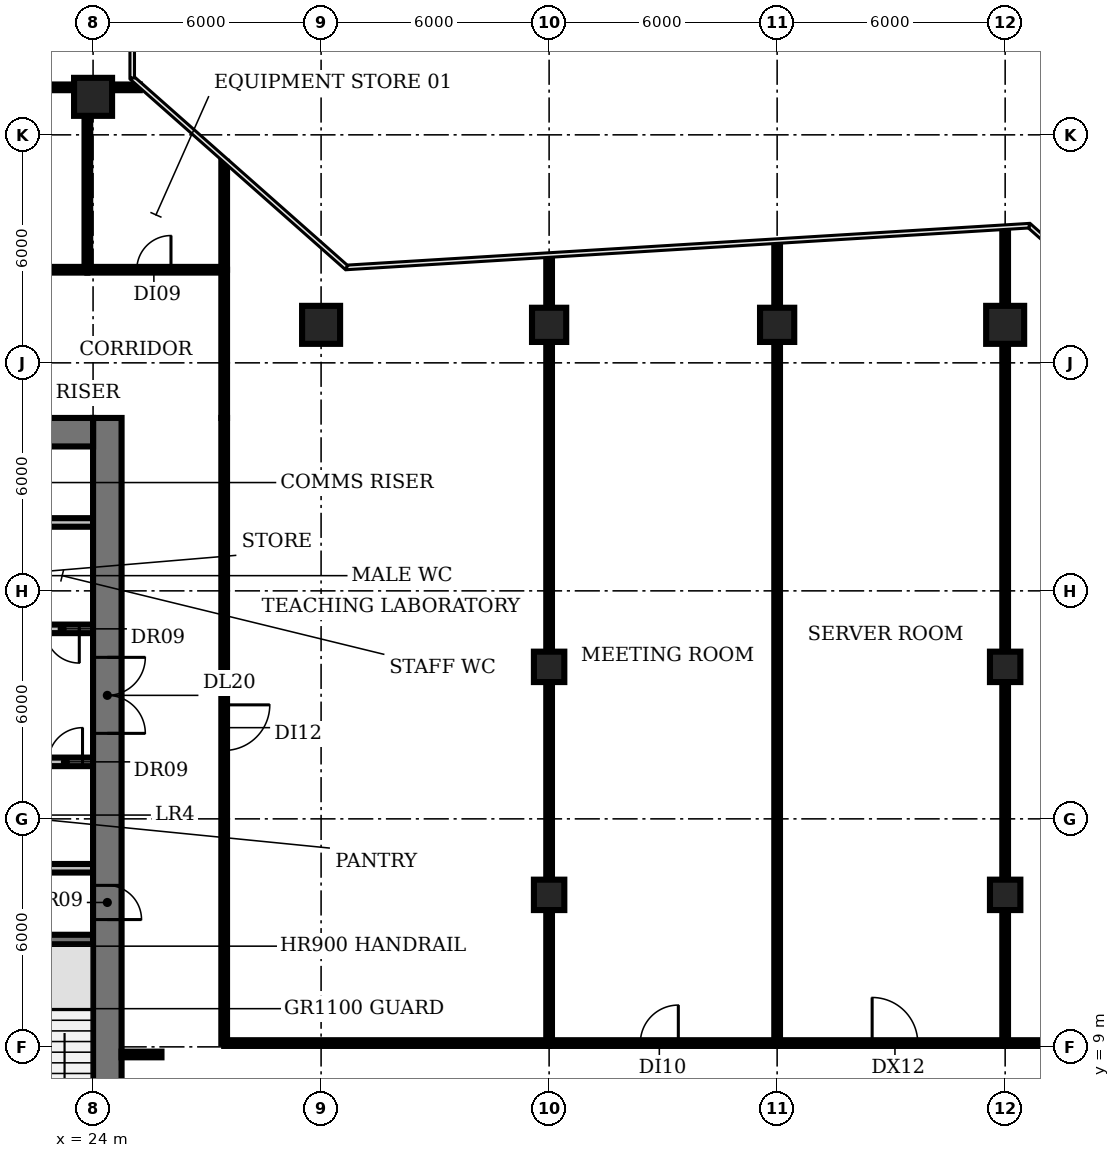
"""IFC4 building model, lengths in metres.
Left out: names, types, materials, properties, quantities, classifications, styles, units other than length and angle.
Written with IfcOpenShell. Run it as: python <this file> out.ifc"""

import sys

from ifc_helpers import new_model, si_unit, direction, frame, frame_2d, origin, origin_2d, place, context, subcontext, project, spatial, rectangle, circle, extrude, element, fill, save


model = new_model("IFC4")
c1 = context("Model", 3, precision=1e-05, world=origin(), true_north=direction((0.0, 1.0)))
c2 = subcontext(c1, "Body", "Model", "MODEL_VIEW")
j1 = project(units=[si_unit("LENGTHUNIT", "METRE"), si_unit("PLANEANGLEUNIT", "RADIAN")], contexts=[c1])
p1 = place(None, origin())
s1 = spatial("IfcSite", under=j1, at=p1, CompositionType="ELEMENT")
p2 = place(p1, origin())
s2 = spatial("IfcBuilding", under=s1, at=p2, CompositionType="ELEMENT")
p3 = place(p2, frame((0.0, 0.0, 96.2)))
s3 = spatial("IfcBuildingStorey", under=s2, at=p3, CompositionType="ELEMENT", Elevation=96.2)
for number, where, z_axis, x_axis in (
    (1, (24.0, 34.0, 0.0), (0.0, 0.0, 1.0), (1.0, 0.0, 0.0)),
    (2, (30.0, 28.0, 0.0), (0.0, 0.0, 1.0), (1.0, 0.0, 0.0)),
):
    element("IfcColumn", number, at=place(p3, frame(where, z_axis=z_axis, x_axis=x_axis)), inside=s3, PredefinedType="COLUMN", context=c2, shape_type="SweptSolid", body=[
        extrude(circle(Radius=0.5, at=origin_2d()), origin(), (0.0, 0.0, 1.0), 3.85),
    ])
for number, where, z_axis, x_axis in (
    (3, (36.0, 13.0, 0.0), (0.0, 0.0, 1.0), (1.0, 0.0, 0.0)),
    (4, (36.0, 19.0, 0.0), (0.0, 0.0, 1.0), (1.0, 0.0, 0.0)),
):
    element("IfcColumn", number, at=place(p3, frame(where, z_axis=z_axis, x_axis=x_axis)), inside=s3, PredefinedType="COLUMN", context=c2, shape_type="SweptSolid", body=[
        extrude(rectangle(XDim=0.8, YDim=0.8, at=origin_2d()), origin(), (0.0, 0.0, 1.0), 3.85),
    ])
for number, where, z_axis, x_axis in (
    (5, (36.0, 28.0, 0.0), (0.0, 0.0, 1.0), (1.0, 0.0, 0.0)),
    (6, (42.0, 28.0, 0.0), (0.0, 0.0, 1.0), (1.0, 0.0, 0.0)),
):
    element("IfcColumn", number, at=place(p3, frame(where, z_axis=z_axis, x_axis=x_axis)), inside=s3, PredefinedType="COLUMN", context=c2, shape_type="SweptSolid", body=[
        extrude(rectangle(XDim=0.9, YDim=0.9, at=origin_2d()), origin(), (0.0, 0.0, 1.0), 3.85),
    ])
for number, where, z_axis, x_axis in (
    (7, (48.0, 13.0, 0.0), (0.0, 0.0, 1.0), (1.0, 0.0, 0.0)),
    (8, (48.0, 19.0, 0.0), (0.0, 0.0, 1.0), (1.0, 0.0, 0.0)),
):
    element("IfcColumn", number, at=place(p3, frame(where, z_axis=z_axis, x_axis=x_axis)), inside=s3, PredefinedType="COLUMN", context=c2, shape_type="SweptSolid", body=[
        extrude(rectangle(XDim=0.8, YDim=0.8, at=origin_2d()), origin(), (0.0, 0.0, 1.0), 3.85),
    ])
p4 = place(p3, frame((48.0, 28.0, 0.0), z_axis=(0.0, 0.0, 1.0), x_axis=(1.0, 0.0, 0.0)))
e9 = element("IfcColumn", 9, at=p4, inside=s3, PredefinedType="COLUMN", context=c2, shape_type="SweptSolid", body=[
    extrude(circle(Radius=0.5, at=origin_2d()), origin(), (0.0, 0.0, 1.0), 3.85),
])
p5 = place(p3, frame((20.85, 11.825, 0.0), z_axis=(0.0, 0.0, 1.0), x_axis=(1.0, 0.0, 0.0)))
e10 = element("IfcWall", 10, at=p5, inside=s3, PredefinedType="SHEAR", context=c2, shape_type="SweptSolid", body=[
    extrude(rectangle(XDim=3.15, YDim=0.25, at=frame_2d((1.575, 0.0))), origin(), (0.0, 0.0, 1.0), 3.85),
])
p6 = place(p3, frame((16.6, 13.7, 0.0), z_axis=(0.0, 0.0, 1.0), x_axis=(1.0, 0.0, 0.0)))
e11 = element("IfcWall", 11, at=p6, inside=s3, PredefinedType="PARTITIONING", context=c2, shape_type="SweptSolid", body=[
    extrude(rectangle(XDim=7.4, YDim=0.225, at=frame_2d((3.7, 0.0))), origin(), (0.0, 0.0, 1.0), 3.85),
])
p7 = place(p3, frame((9.4, 16.5, 0.0), z_axis=(0.0, 0.0, 1.0), x_axis=(1.0, 0.0, 0.0)))
e12 = element("IfcWall", 12, at=p7, inside=s3, PredefinedType="PARTITIONING", context=c2, shape_type="SweptSolid", body=[
    extrude(rectangle(XDim=14.6, YDim=0.225, at=frame_2d((7.3, 0.0))), origin(), (0.0, 0.0, 1.0), 3.85),
])
p8 = place(p7, frame((0.75, 0.0, 0.0)))
e13 = element("IfcOpeningElement", 13, at=p8, cuts=e12, PredefinedType="OPENING", context=c2, shape_type="SweptSolid", body=[
    extrude(rectangle(XDim=1.1, YDim=2.1, at=frame_2d((0.55, 1.05))), frame((0.0, 0.123, 0.0), z_axis=(0.0, -1.0, 0.0), x_axis=(1.0, 0.0, 0.0)), (0.0, 0.0, 1.0), 0.245),
])
p9 = place(p7, frame((3.55, 0.0, 0.0)))
e14 = element("IfcOpeningElement", 14, at=p9, cuts=e12, PredefinedType="OPENING", context=c2, shape_type="SweptSolid", body=[
    extrude(rectangle(XDim=1.1, YDim=2.1, at=frame_2d((0.55, 1.05))), frame((0.0, 0.123, 0.0), z_axis=(0.0, -1.0, 0.0), x_axis=(1.0, 0.0, 0.0)), (0.0, 0.0, 1.0), 0.245),
])
p10 = place(p7, frame((6.35, 0.0, 0.0)))
e15 = element("IfcOpeningElement", 15, at=p10, cuts=e12, PredefinedType="OPENING", context=c2, shape_type="SweptSolid", body=[
    extrude(rectangle(XDim=1.1, YDim=2.1, at=frame_2d((0.55, 1.05))), frame((0.0, 0.123, 0.0), z_axis=(0.0, -1.0, 0.0), x_axis=(1.0, 0.0, 0.0)), (0.0, 0.0, 1.0), 0.245),
])
p11 = place(p7, frame((9.15, 0.0, 0.0)))
e16 = element("IfcOpeningElement", 16, at=p11, cuts=e12, PredefinedType="OPENING", context=c2, shape_type="SweptSolid", body=[
    extrude(rectangle(XDim=1.1, YDim=2.1, at=frame_2d((0.55, 1.05))), frame((0.0, 0.123, 0.0), z_axis=(0.0, -1.0, 0.0), x_axis=(1.0, 0.0, 0.0)), (0.0, 0.0, 1.0), 0.245),
])
p12 = place(p7, frame((11.647, 0.0, 0.0)))
e17 = element("IfcOpeningElement", 17, at=p12, cuts=e12, PredefinedType="OPENING", context=c2, shape_type="SweptSolid", body=[
    extrude(rectangle(XDim=0.9, YDim=2.1, at=frame_2d((0.45, 1.05))), frame((0.0, 0.123, 0.0), z_axis=(0.0, -1.0, 0.0), x_axis=(1.0, 0.0, 0.0)), (0.0, 0.0, 1.0), 0.245),
])
p13 = place(p7, frame((13.423, 0.0, 0.0)))
e18 = element("IfcOpeningElement", 18, at=p13, cuts=e12, PredefinedType="OPENING", context=c2, shape_type="SweptSolid", body=[
    extrude(rectangle(XDim=0.9, YDim=2.1, at=frame_2d((0.45, 1.05))), frame((0.0, 0.123, 0.0), z_axis=(0.0, -1.0, 0.0), x_axis=(1.0, 0.0, 0.0)), (0.0, 0.0, 1.0), 0.245),
])
p14 = place(p3, frame((24.0, 20.0, 0.0), z_axis=(0.0, 0.0, 1.0), x_axis=(-1.0, 0.0, 0.0)))
e19 = element("IfcWall", 19, at=p14, inside=s3, PredefinedType="PARTITIONING", context=c2, shape_type="SweptSolid", body=[
    extrude(rectangle(XDim=14.6, YDim=0.225, at=frame_2d((7.3, 0.0))), origin(), (0.0, 0.0, 1.0), 3.85),
])
p15 = place(p14, frame((12.5, 0.0, 0.0)))
e20 = element("IfcOpeningElement", 20, at=p15, cuts=e19, PredefinedType="OPENING", context=c2, shape_type="SweptSolid", body=[
    extrude(rectangle(XDim=1.0, YDim=2.1, at=frame_2d((0.5, 1.05))), frame((0.0, 0.123, 0.0), z_axis=(0.0, -1.0, 0.0), x_axis=(1.0, 0.0, 0.0)), (0.0, 0.0, 1.0), 0.245),
])
p16 = place(p14, frame((8.825, 0.0, 0.0)))
e21 = element("IfcOpeningElement", 21, at=p16, cuts=e19, PredefinedType="OPENING", context=c2, shape_type="SweptSolid", body=[
    extrude(rectangle(XDim=1.0, YDim=2.1, at=frame_2d((0.5, 1.05))), frame((0.0, 0.123, 0.0), z_axis=(0.0, -1.0, 0.0), x_axis=(1.0, 0.0, 0.0)), (0.0, 0.0, 1.0), 0.245),
])
p17 = place(p14, frame((4.925, 0.0, 0.0)))
e22 = element("IfcOpeningElement", 22, at=p17, cuts=e19, PredefinedType="OPENING", context=c2, shape_type="SweptSolid", body=[
    extrude(rectangle(XDim=1.0, YDim=2.1, at=frame_2d((0.5, 1.05))), frame((0.0, 0.123, 0.0), z_axis=(0.0, -1.0, 0.0), x_axis=(1.0, 0.0, 0.0)), (0.0, 0.0, 1.0), 0.245),
])
p18 = place(p14, frame((2.137, 0.0, 0.0)))
e23 = element("IfcOpeningElement", 23, at=p18, cuts=e19, PredefinedType="OPENING", context=c2, shape_type="SweptSolid", body=[
    extrude(rectangle(XDim=0.9, YDim=2.1, at=frame_2d((0.45, 1.05))), frame((0.0, 0.123, 0.0), z_axis=(0.0, -1.0, 0.0), x_axis=(1.0, 0.0, 0.0)), (0.0, 0.0, 1.0), 0.245),
])
p19 = place(p14, frame((0.363, 0.0, 0.0)))
e24 = element("IfcOpeningElement", 24, at=p19, cuts=e19, PredefinedType="OPENING", context=c2, shape_type="SweptSolid", body=[
    extrude(rectangle(XDim=0.9, YDim=2.1, at=frame_2d((0.45, 1.05))), frame((0.0, 0.123, 0.0), z_axis=(0.0, -1.0, 0.0), x_axis=(1.0, 0.0, 0.0)), (0.0, 0.0, 1.0), 0.245),
])
p20 = place(p3, frame((9.4, 22.8, 0.0), z_axis=(0.0, 0.0, 1.0), x_axis=(1.0, 0.0, 0.0)))
e25 = element("IfcWall", 25, at=p20, inside=s3, PredefinedType="PARTITIONING", context=c2, shape_type="SweptSolid", body=[
    extrude(rectangle(XDim=14.6, YDim=0.225, at=frame_2d((7.3, 0.0))), origin(), (0.0, 0.0, 1.0), 3.85),
])
p21 = place(p3, frame((24.375, 25.55, 0.0), z_axis=(0.0, 0.0, 1.0), x_axis=(0.0, -1.0, 0.0)))
e26 = element("IfcWall", 26, at=p21, inside=s3, PredefinedType="SHEAR", context=c2, shape_type="SweptSolid", body=[
    extrude(rectangle(XDim=21.13, YDim=0.75, at=frame_2d((10.565, 0.0))), origin(), (0.0, 0.0, 1.0), 3.85),
])
p22 = place(p21, frame((18.4, 0.0, 0.0)))
e27 = element("IfcOpeningElement", 27, at=p22, cuts=e26, PredefinedType="OPENING", context=c2, shape_type="SweptSolid", body=[
    extrude(rectangle(XDim=1.5, YDim=2.1, at=frame_2d((0.75, 1.05))), frame((0.0, 0.385, 0.0), z_axis=(0.0, -1.0, 0.0), x_axis=(1.0, 0.0, 0.0)), (0.0, 0.0, 1.0), 0.77),
])
p23 = place(p21, frame((12.3, 0.0, 0.0)))
e28 = element("IfcOpeningElement", 28, at=p23, cuts=e26, PredefinedType="OPENING", context=c2, shape_type="SweptSolid", body=[
    extrude(rectangle(XDim=0.9, YDim=2.1, at=frame_2d((0.45, 1.05))), frame((0.0, 0.385, 0.0), z_axis=(0.0, -1.0, 0.0), x_axis=(1.0, 0.0, 0.0)), (0.0, 0.0, 1.0), 0.77),
])
p24 = place(p21, frame((6.3, 0.0, 0.0)))
e29 = element("IfcOpeningElement", 29, at=p24, cuts=e26, PredefinedType="OPENING", context=c2, shape_type="SweptSolid", body=[
    extrude(rectangle(XDim=2.0, YDim=2.1, at=frame_2d((1.0, 1.05))), frame((0.0, 0.385, 0.0), z_axis=(0.0, -1.0, 0.0), x_axis=(1.0, 0.0, 0.0)), (0.0, 0.0, 1.0), 0.77),
])
p25 = place(p3, frame((6.0, 25.175, 0.0), z_axis=(0.0, 0.0, 1.0), x_axis=(1.0, 0.0, 0.0)))
e30 = element("IfcWall", 30, at=p25, inside=s3, PredefinedType="SHEAR", context=c2, shape_type="SweptSolid", body=[
    extrude(rectangle(XDim=18.0, YDim=0.75, at=frame_2d((9.0, 0.0))), origin(), (0.0, 0.0, 1.0), 3.85),
])
p26 = place(p3, frame((10.35, 34.25, 0.0), z_axis=(0.0, 0.0, 1.0), x_axis=(1.0, 0.0, 0.0)))
e31 = element("IfcWall", 31, at=p26, inside=s3, PredefinedType="PARTITIONING", context=c2, shape_type="SweptSolid", body=[
    extrude(rectangle(XDim=14.88, YDim=0.15, at=frame_2d((7.44, 0.0))), origin(), (0.0, 0.0, 1.0), 2.83),
])
p27 = place(p3, frame((20.8, 29.45, 0.0), z_axis=(0.0, 0.0, 1.0), x_axis=(1.0, 0.0, 0.0)))
e32 = element("IfcWall", 32, at=p27, inside=s3, PredefinedType="PARTITIONING", context=c2, shape_type="SweptSolid", body=[
    extrude(rectangle(XDim=3.05, YDim=0.15, at=frame_2d((1.525, 0.0))), origin(), (0.0, 0.0, 1.0), 2.83),
])
p28 = place(p3, frame((23.85, 29.45, 0.0), z_axis=(0.0, 0.0, 1.0), x_axis=(0.0, 1.0, 0.0)))
e33 = element("IfcWall", 33, at=p28, inside=s3, PredefinedType="PARTITIONING", context=c2, shape_type="SweptSolid", body=[
    extrude(rectangle(XDim=4.8, YDim=0.15, at=frame_2d((2.4, 0.0))), origin(), (0.0, 0.0, 1.0), 2.83),
])
p29 = place(p3, frame((23.85, 29.45, 0.0), z_axis=(0.0, 0.0, 1.0), x_axis=(1.0, 0.0, 0.0)))
e34 = element("IfcWall", 34, at=p29, inside=s3, PredefinedType="PARTITIONING", context=c2, shape_type="SweptSolid", body=[
    extrude(rectangle(XDim=3.6, YDim=0.15, at=frame_2d((1.8, 0.0))), origin(), (0.0, 0.0, 1.0), 2.83),
])
p30 = place(p29, frame((1.3, 0.0, 0.0)))
e35 = element("IfcOpeningElement", 35, at=p30, cuts=e34, PredefinedType="OPENING", context=c2, shape_type="SweptSolid", body=[
    extrude(rectangle(XDim=0.9, YDim=2.1, at=frame_2d((0.45, 1.05))), frame((0.0, 0.085, 0.0), z_axis=(0.0, -1.0, 0.0), x_axis=(1.0, 0.0, 0.0)), (0.0, 0.0, 1.0), 0.17),
])
p31 = place(p3, frame((24.75, 8.8, 0.0), z_axis=(0.0, 0.0, 1.0), x_axis=(1.0, 0.0, 0.0)))
e36 = element("IfcWall", 36, at=p31, inside=s3, PredefinedType="PARTITIONING", context=c2, shape_type="SweptSolid", body=[
    extrude(rectangle(XDim=1.05, YDim=0.15, at=frame_2d((0.525, 0.0))), origin(), (0.0, 0.0, 1.0), 2.83),
])
p32 = place(p3, frame((27.45, 9.1, 0.0), z_axis=(0.0, 0.0, 1.0), x_axis=(1.0, 0.0, 0.0)))
e37 = element("IfcWall", 37, at=p32, inside=s3, PredefinedType="PARTITIONING", context=c2, shape_type="SweptSolid", body=[
    extrude(rectangle(XDim=8.55, YDim=0.15, at=frame_2d((4.275, 0.0))), origin(), (0.0, 0.0, 1.0), 2.83),
])
p33 = place(p3, frame((27.45, 25.55, 0.0), z_axis=(0.0, 0.0, 1.0), x_axis=(0.0, -1.0, 0.0)))
e38 = element("IfcWall", 38, at=p33, inside=s3, PredefinedType="PARTITIONING", context=c2, shape_type="SweptSolid", body=[
    extrude(rectangle(XDim=16.45, YDim=0.15, at=frame_2d((8.225, 0.0))), origin(), (0.0, 0.0, 1.0), 2.83),
])
p34 = place(p33, frame((7.55, 0.0, 0.0)))
e39 = element("IfcOpeningElement", 39, at=p34, cuts=e38, PredefinedType="OPENING", context=c2, shape_type="SweptSolid", body=[
    extrude(rectangle(XDim=1.2, YDim=2.1, at=frame_2d((0.6, 1.05))), frame((0.0, 0.085, 0.0), z_axis=(0.0, -1.0, 0.0), x_axis=(1.0, 0.0, 0.0)), (0.0, 0.0, 1.0), 0.17),
])
p35 = place(p3, frame((27.45, 25.55, 0.0), z_axis=(0.0, 0.0, 1.0), x_axis=(0.0, 1.0, 0.0)))
e40 = element("IfcWall", 40, at=p35, inside=s3, PredefinedType="PARTITIONING", context=c2, shape_type="SweptSolid", body=[
    extrude(rectangle(XDim=3.9, YDim=0.15, at=frame_2d((1.95, 0.0))), origin(), (0.0, 0.0, 1.0), 2.83),
])
p36 = place(p3, frame((27.45, 29.45, 0.0), z_axis=(0.0, 0.0, 1.0), x_axis=(0.0, 1.0, 0.0)))
e41 = element("IfcWall", 41, at=p36, inside=s3, PredefinedType="PARTITIONING", context=c2, shape_type="SweptSolid", body=[
    extrude(rectangle(XDim=2.84, YDim=0.15, at=frame_2d((1.42, 0.0))), origin(), (0.0, 0.0, 1.0), 2.83),
])
p37 = place(p3, frame((36.0, 9.1, 0.0), z_axis=(0.0, 0.0, 1.0), x_axis=(0.0, 1.0, 0.0)))
e42 = element("IfcWall", 42, at=p37, inside=s3, PredefinedType="PARTITIONING", context=c2, shape_type="SweptSolid", body=[
    extrude(rectangle(XDim=20.69, YDim=0.15, at=frame_2d((10.345, 0.0))), origin(), (0.0, 0.0, 1.0), 2.83),
])
p38 = place(p3, frame((36.0, 9.1, 0.0), z_axis=(0.0, 0.0, 1.0), x_axis=(1.0, 0.0, 0.0)))
e43 = element("IfcWall", 43, at=p38, inside=s3, PredefinedType="PARTITIONING", context=c2, shape_type="SweptSolid", body=[
    extrude(rectangle(XDim=6.0, YDim=0.15, at=frame_2d((3.0, 0.0))), origin(), (0.0, 0.0, 1.0), 2.83),
])
p39 = place(p38, frame((2.4, 0.0, 0.0)))
e44 = element("IfcOpeningElement", 44, at=p39, cuts=e43, PredefinedType="OPENING", context=c2, shape_type="SweptSolid", body=[
    extrude(rectangle(XDim=1.0, YDim=2.1, at=frame_2d((0.5, 1.05))), frame((0.0, 0.085, 0.0), z_axis=(0.0, -1.0, 0.0), x_axis=(1.0, 0.0, 0.0)), (0.0, 0.0, 1.0), 0.17),
])
p40 = place(p3, frame((42.0, 9.1, 0.0), z_axis=(0.0, 0.0, 1.0), x_axis=(0.0, 1.0, 0.0)))
e45 = element("IfcWall", 45, at=p40, inside=s3, PredefinedType="PARTITIONING", context=c2, shape_type="SweptSolid", body=[
    extrude(rectangle(XDim=21.05, YDim=0.15, at=frame_2d((10.525, 0.0))), origin(), (0.0, 0.0, 1.0), 2.83),
])
p41 = place(p3, frame((42.0, 9.1, 0.0), z_axis=(0.0, 0.0, 1.0), x_axis=(1.0, 0.0, 0.0)))
e46 = element("IfcWall", 46, at=p41, inside=s3, PredefinedType="PARTITIONING", context=c2, shape_type="SweptSolid", body=[
    extrude(rectangle(XDim=6.0, YDim=0.15, at=frame_2d((3.0, 0.0))), origin(), (0.0, 0.0, 1.0), 2.83),
])
p42 = place(p41, frame((2.5, 0.0, 0.0)))
e47 = element("IfcOpeningElement", 47, at=p42, cuts=e46, PredefinedType="OPENING", context=c2, shape_type="SweptSolid", body=[
    extrude(rectangle(XDim=1.2, YDim=2.1, at=frame_2d((0.6, 1.05))), frame((0.0, 0.085, 0.0), z_axis=(0.0, -1.0, 0.0), x_axis=(1.0, 0.0, 0.0)), (0.0, 0.0, 1.0), 0.17),
])
p43 = place(p3, frame((48.0, 9.1, 0.0), z_axis=(0.0, 0.0, 1.0), x_axis=(0.0, 1.0, 0.0)))
e48 = element("IfcWall", 48, at=p43, inside=s3, PredefinedType="PARTITIONING", context=c2, shape_type="SweptSolid", body=[
    extrude(rectangle(XDim=21.42, YDim=0.15, at=frame_2d((10.71, 0.0))), origin(), (0.0, 0.0, 1.0), 2.83),
])
p44 = place(p3, frame((48.0, 9.1, 0.0), z_axis=(0.0, 0.0, 1.0), x_axis=(1.0, 0.0, 0.0)))
e49 = element("IfcWall", 49, at=p44, inside=s3, PredefinedType="PARTITIONING", context=c2, shape_type="SweptSolid", body=[
    extrude(rectangle(XDim=3.88, YDim=0.15, at=frame_2d((1.94, 0.0))), origin(), (0.0, 0.0, 1.0), 2.83),
])
p45 = place(p44, frame((1.28, 0.0, 0.0)))
e50 = element("IfcOpeningElement", 50, at=p45, cuts=e49, PredefinedType="OPENING", context=c2, shape_type="SweptSolid", body=[
    extrude(rectangle(XDim=1.2, YDim=2.1, at=frame_2d((0.6, 1.05))), frame((0.0, 0.085, 0.0), z_axis=(0.0, -1.0, 0.0), x_axis=(1.0, 0.0, 0.0)), (0.0, 0.0, 1.0), 0.17),
])
p46 = place(p13, origin())
e51 = element("IfcDoor", 51, at=p46, inside=s3, OperationType="SINGLE_SWING_RIGHT", PredefinedType="DOOR", context=c2, shape_type="SweptSolid", body=[
    extrude(rectangle(XDim=0.9, YDim=2.1, at=frame_2d((0.45, 1.05))), frame((0.0, 0.025, 0.0), z_axis=(0.0, -1.0, 0.0), x_axis=(1.0, 0.0, 0.0)), (0.0, 0.0, 1.0), 0.05),
])
fill(e18, e51)
p47 = place(p19, origin())
e52 = element("IfcDoor", 52, at=p47, inside=s3, OperationType="SINGLE_SWING_LEFT", PredefinedType="DOOR", context=c2, shape_type="SweptSolid", body=[
    extrude(rectangle(XDim=0.9, YDim=2.1, at=frame_2d((0.45, 1.05))), frame((0.0, 0.025, 0.0), z_axis=(0.0, -1.0, 0.0), x_axis=(1.0, 0.0, 0.0)), (0.0, 0.0, 1.0), 0.05),
])
fill(e24, e52)
p48 = place(p23, origin())
e53 = element("IfcDoor", 53, at=p48, inside=s3, OperationType="SINGLE_SWING_RIGHT", PredefinedType="DOOR", context=c2, shape_type="SweptSolid", body=[
    extrude(rectangle(XDim=0.9, YDim=2.1, at=frame_2d((0.45, 1.05))), frame((0.0, -0.315, 0.0), z_axis=(0.0, -1.0, 0.0), x_axis=(1.0, 0.0, 0.0)), (0.0, 0.0, 1.0), 0.05),
])
fill(e28, e53)
p49 = place(p24, origin())
e54 = element("IfcDoor", 54, at=p49, inside=s3, OperationType="DOUBLE_DOOR_SINGLE_SWING", PredefinedType="DOOR", context=c2, shape_type="SweptSolid", body=[
    extrude(rectangle(XDim=2.0, YDim=2.1, at=frame_2d((1.0, 1.05))), frame((0.0, 0.025, 0.0), z_axis=(0.0, -1.0, 0.0), x_axis=(1.0, 0.0, 0.0)), (0.0, 0.0, 1.0), 0.05),
])
fill(e29, e54)
p50 = place(p30, origin())
e55 = element("IfcDoor", 55, at=p50, inside=s3, OperationType="SINGLE_SWING_RIGHT", PredefinedType="DOOR", context=c2, shape_type="SweptSolid", body=[
    extrude(rectangle(XDim=0.9, YDim=2.1, at=frame_2d((0.45, 1.05))), frame((0.0, 0.025, 0.0), z_axis=(0.0, -1.0, 0.0), x_axis=(1.0, 0.0, 0.0)), (0.0, 0.0, 1.0), 0.05),
])
fill(e35, e55)
p51 = place(p34, origin())
e56 = element("IfcDoor", 56, at=p51, inside=s3, OperationType="SINGLE_SWING_LEFT", PredefinedType="DOOR", context=c2, shape_type="SweptSolid", body=[
    extrude(rectangle(XDim=1.2, YDim=2.1, at=frame_2d((0.6, 1.05))), frame((0.0, 0.025, 0.0), z_axis=(0.0, -1.0, 0.0), x_axis=(1.0, 0.0, 0.0)), (0.0, 0.0, 1.0), 0.05),
])
fill(e39, e56)
p52 = place(p39, origin())
e57 = element("IfcDoor", 57, at=p52, inside=s3, OperationType="SINGLE_SWING_RIGHT", PredefinedType="DOOR", context=c2, shape_type="SweptSolid", body=[
    extrude(rectangle(XDim=1.0, YDim=2.1, at=frame_2d((0.5, 1.05))), frame((0.0, 0.025, 0.0), z_axis=(0.0, -1.0, 0.0), x_axis=(1.0, 0.0, 0.0)), (0.0, 0.0, 1.0), 0.05),
])
fill(e44, e57)
p53 = place(p42, origin())
e58 = element("IfcDoor", 58, at=p53, inside=s3, OperationType="SINGLE_SWING_LEFT", PredefinedType="DOOR", context=c2, shape_type="SweptSolid", body=[
    extrude(rectangle(XDim=1.2, YDim=2.1, at=frame_2d((0.6, 1.05))), frame((0.0, 0.025, 0.0), z_axis=(0.0, -1.0, 0.0), x_axis=(1.0, 0.0, 0.0)), (0.0, 0.0, 1.0), 0.05),
])
fill(e47, e58)
save(model, sys.argv[1])
